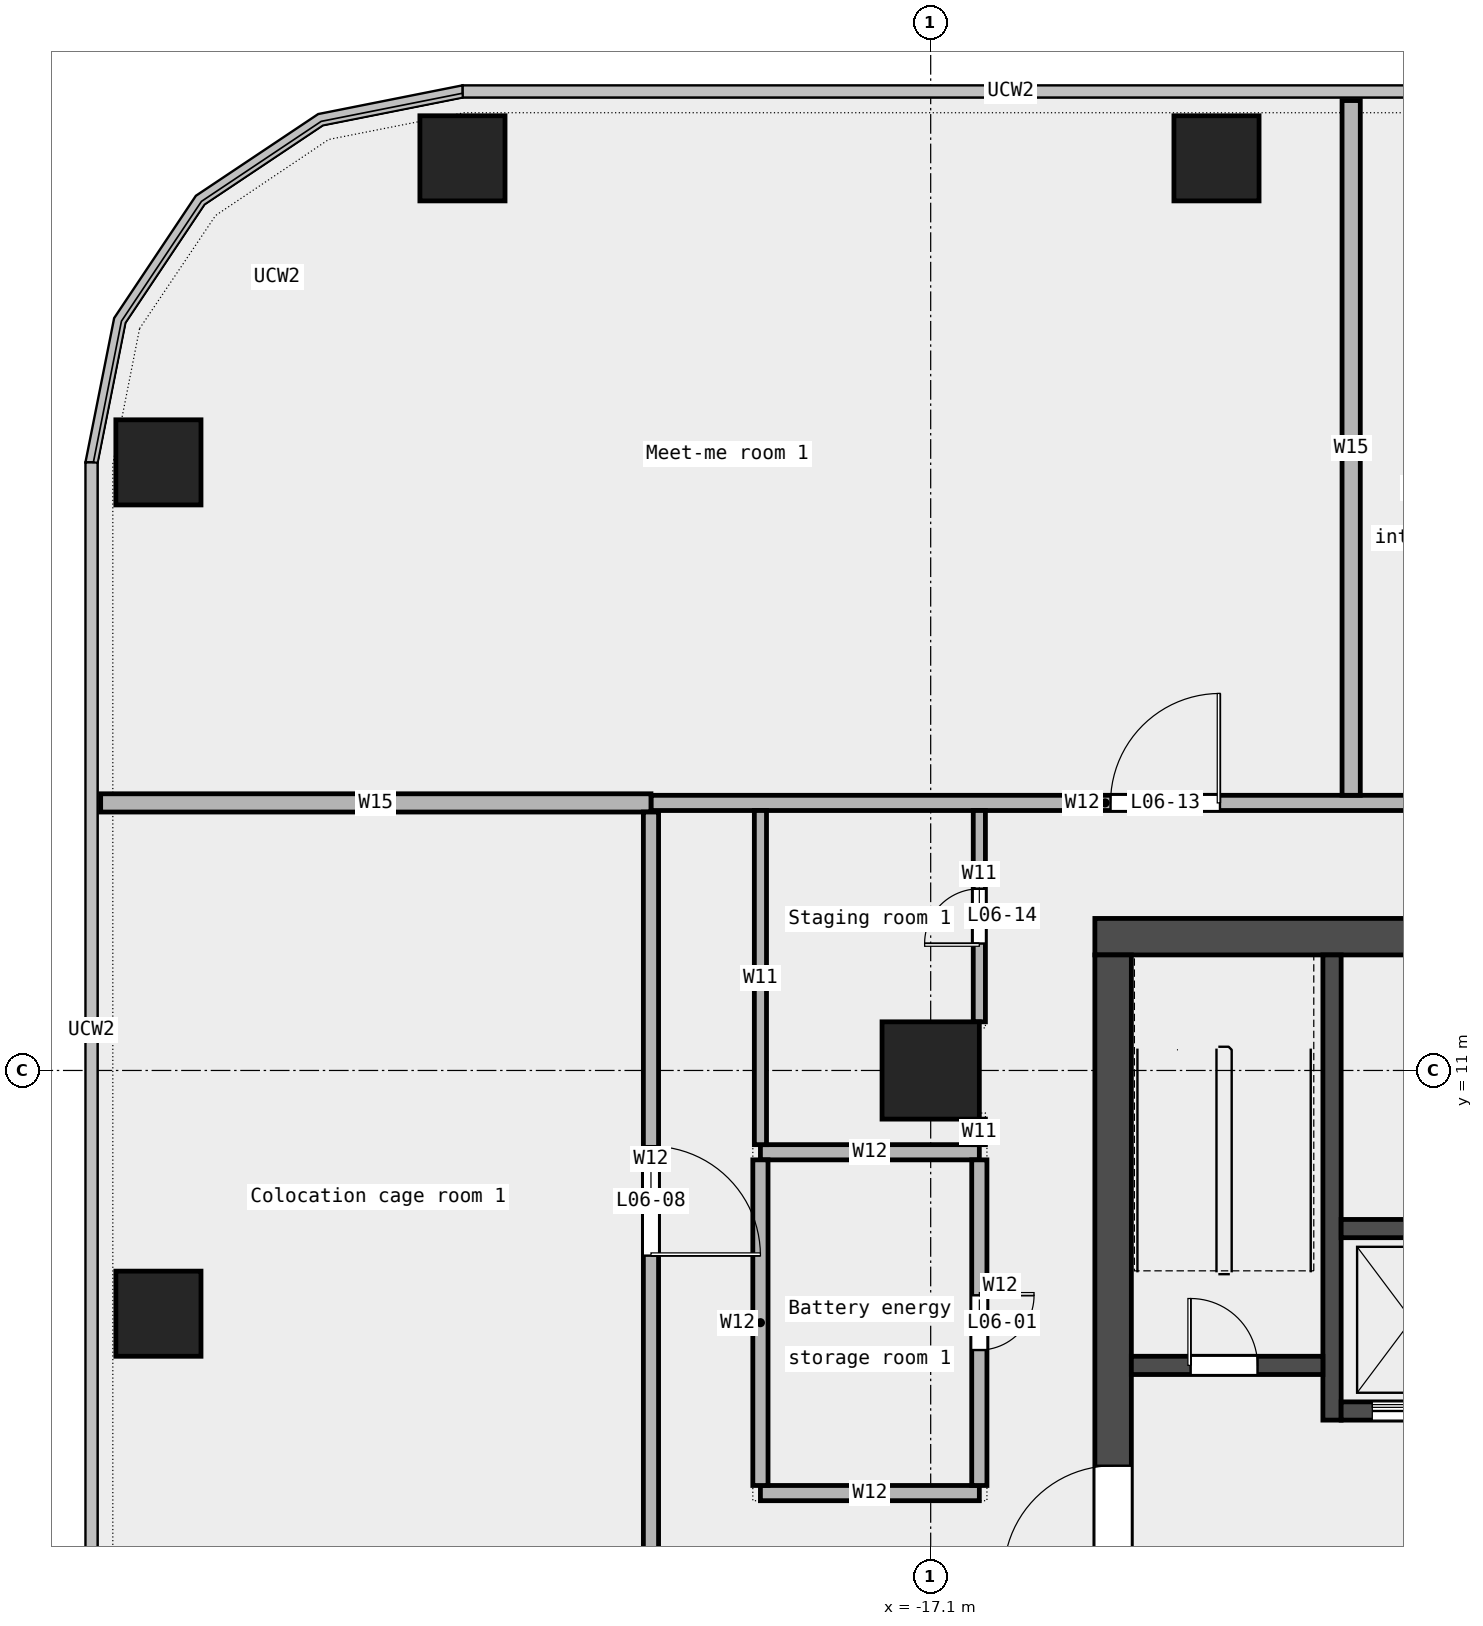
"""IFC4 building model, lengths in metres.
Left out: names, types, materials, properties, quantities, classifications, styles, units other than length and angle.
Written with IfcOpenShell. Run it as: python <this file> out.ifc"""

import sys

from ifc_helpers import new_model, si_unit, direction, frame, frame_2d, origin, origin_2d, place, context, subcontext, project, spatial, rectangle, extrude, element, fill, save


model = new_model("IFC4")
c1 = context("Model", 3, precision=1e-05, world=origin(), true_north=direction((0.0, 1.0)))
c2 = subcontext(c1, "Body", "Model", "MODEL_VIEW")
j1 = project(units=[si_unit("LENGTHUNIT", "METRE"), si_unit("PLANEANGLEUNIT", "RADIAN")], contexts=[c1])
p1 = place(None, origin())
s1 = spatial("IfcSite", under=j1, at=p1, CompositionType="ELEMENT")
p2 = place(p1, origin())
s2 = spatial("IfcBuilding", under=s1, at=p2, CompositionType="ELEMENT")
p3 = place(p2, frame((0.0, 0.0, 35.8)))
s3 = spatial("IfcBuildingStorey", under=s2, at=p3, CompositionType="ELEMENT", Elevation=35.8)
for number, where, z_axis, x_axis in (
    (1, (-12.4, 26.0, 0.0), (0.0, 0.0, 1.0), (1.0, 0.0, 0.0)),
    (2, (-24.8, 26.0, 0.0), (0.0, 0.0, 1.0), (1.0, 0.0, 0.0)),
    (3, (-29.8, 21.0, 0.0), (0.0, 0.0, 1.0), (1.0, 0.0, 0.0)),
    (4, (-29.8, 7.0, 0.0), (0.0, 0.0, 1.0), (1.0, 0.0, 0.0)),
):
    element("IfcColumn", number, at=place(p3, frame(where, z_axis=z_axis, x_axis=x_axis)), inside=s3, PredefinedType="COLUMN", context=c2, shape_type="SweptSolid", body=[
        extrude(rectangle(XDim=1.4, YDim=1.4, at=origin_2d()), origin(), (0.0, 0.0, 1.0), 4.35),
    ])
p4 = place(p3, frame((-17.1, 11.0, 0.0), z_axis=(0.0, 0.0, 1.0), x_axis=(1.0, 0.0, 0.0)))
e5 = element("IfcColumn", 5, at=p4, inside=s3, PredefinedType="COLUMN", context=c2, shape_type="SweptSolid", body=[
    extrude(rectangle(XDim=1.6, YDim=1.6, at=origin_2d()), origin(), (0.0, 0.0, 1.0), 4.35),
])
for number, where, z_axis, x_axis in (
    (6, (-19.9, 4.05, 0.0), (0.0, 0.0, 1.0), (1.0, 0.0, 0.0)),
    (7, (-19.9, 9.655, 0.0), (0.0, 0.0, 1.0), (1.0, 0.0, 0.0)),
):
    element("IfcWall", number, at=place(p3, frame(where, z_axis=z_axis, x_axis=x_axis)), inside=s3, PredefinedType="PARTITIONING", context=c2, shape_type="SweptSolid", body=[
        extrude(rectangle(XDim=3.6, YDim=0.25, at=frame_2d((1.8, 0.0))), origin(), (0.0, 0.0, 1.0), 4.35),
    ])
p5 = place(p3, frame((-21.7, 15.4, 0.0), z_axis=(0.0, 0.0, 1.0), x_axis=(1.0, 0.0, 0.0)))
e8 = element("IfcWall", 8, at=p5, inside=s3, PredefinedType="PARTITIONING", context=c2, shape_type="SweptSolid", body=[
    extrude(rectangle(XDim=14.935, YDim=0.25, at=frame_2d((7.468, 0.0))), origin(), (0.0, 0.0, 1.0), 4.35),
])
p6 = place(p5, frame((12.775, 0.0, 0.0)))
e9 = element("IfcOpeningElement", 9, at=p6, cuts=e8, PredefinedType="OPENING", context=c2, shape_type="SweptSolid", body=[
    extrude(rectangle(XDim=0.9, YDim=2.1, at=frame_2d((0.45, 1.05))), frame((0.0, 0.137, 0.0), z_axis=(0.0, -1.0, 0.0), x_axis=(1.0, 0.0, 0.0)), (0.0, 0.0, 1.0), 0.274),
])
p7 = place(p5, frame((7.558, 0.0, 0.0)))
e10 = element("IfcOpeningElement", 10, at=p7, cuts=e8, PredefinedType="OPENING", context=c2, shape_type="SweptSolid", body=[
    extrude(rectangle(XDim=1.8, YDim=2.1, at=frame_2d((0.9, 1.05))), frame((0.0, 0.137, 0.0), z_axis=(0.0, -1.0, 0.0), x_axis=(1.0, 0.0, 0.0)), (0.0, 0.0, 1.0), 0.274),
])
p8 = place(p3, frame((-30.75, 15.4, 0.0), z_axis=(0.0, 0.0, 1.0), x_axis=(1.0, 0.0, 0.0)))
e11 = element("IfcWall", 11, at=p8, inside=s3, PredefinedType="PARTITIONING", context=c2, shape_type="SweptSolid", body=[
    extrude(rectangle(XDim=9.05, YDim=0.3, at=frame_2d((4.525, 0.0))), origin(), (0.0, 0.0, 1.0), 4.35),
])
p9 = place(p3, frame((-21.7, 2.46, 0.0), z_axis=(0.0, 0.0, 1.0), x_axis=(0.0, 1.0, 0.0)))
e12 = element("IfcWall", 12, at=p9, inside=s3, PredefinedType="PARTITIONING", context=c2, shape_type="SweptSolid", body=[
    extrude(rectangle(XDim=12.79, YDim=0.25, at=frame_2d((6.395, 0.0))), origin(), (0.0, 0.0, 1.0), 4.35),
])
p10 = place(p9, frame((5.495, 0.0, 0.0)))
e13 = element("IfcOpeningElement", 13, at=p10, cuts=e12, PredefinedType="OPENING", context=c2, shape_type="SweptSolid", body=[
    extrude(rectangle(XDim=1.8, YDim=2.1, at=frame_2d((0.9, 1.05))), frame((0.0, 0.137, 0.0), z_axis=(0.0, -1.0, 0.0), x_axis=(1.0, 0.0, 0.0)), (0.0, 0.0, 1.0), 0.274),
])
p11 = place(p3, frame((-19.9, 9.78, 0.0), z_axis=(0.0, 0.0, 1.0), x_axis=(0.0, 1.0, 0.0)))
e14 = element("IfcWall", 14, at=p11, inside=s3, PredefinedType="PARTITIONING", context=c2, shape_type="SweptSolid", body=[
    extrude(rectangle(XDim=5.495, YDim=0.2, at=frame_2d((2.748, 0.0))), origin(), (0.0, 0.0, 1.0), 4.35),
])
p12 = place(p3, frame((-19.9, 4.175, 0.0), z_axis=(0.0, 0.0, 1.0), x_axis=(0.0, 1.0, 0.0)))
e15 = element("IfcWall", 15, at=p12, inside=s3, PredefinedType="PARTITIONING", context=c2, shape_type="SweptSolid", body=[
    extrude(rectangle(XDim=5.355, YDim=0.25, at=frame_2d((2.677, 0.0))), origin(), (0.0, 0.0, 1.0), 4.35),
])
p13 = place(p3, frame((-16.3, 9.78, 0.0), z_axis=(0.0, 0.0, 1.0), x_axis=(0.0, 1.0, 0.0)))
e16 = element("IfcWall", 16, at=p13, inside=s3, PredefinedType="PARTITIONING", context=c2, shape_type="SweptSolid", body=[
    extrude(rectangle(XDim=0.42, YDim=0.2, at=frame_2d((0.21, 0.0))), origin(), (0.0, 0.0, 1.0), 4.35),
])
p14 = place(p3, frame((-16.3, 11.8, 0.0), z_axis=(0.0, 0.0, 1.0), x_axis=(0.0, 1.0, 0.0)))
e17 = element("IfcWall", 17, at=p14, inside=s3, PredefinedType="PARTITIONING", context=c2, shape_type="SweptSolid", body=[
    extrude(rectangle(XDim=3.475, YDim=0.2, at=frame_2d((1.737, 0.0))), origin(), (0.0, 0.0, 1.0), 4.35),
])
p15 = place(p14, frame((1.288, 0.0, 0.0)))
e18 = element("IfcOpeningElement", 18, at=p15, cuts=e17, PredefinedType="OPENING", context=c2, shape_type="SweptSolid", body=[
    extrude(rectangle(XDim=0.9, YDim=2.1, at=frame_2d((0.45, 1.05))), frame((0.0, 0.112, 0.0), z_axis=(0.0, -1.0, 0.0), x_axis=(1.0, 0.0, 0.0)), (0.0, 0.0, 1.0), 0.224),
])
p16 = place(p3, frame((-16.3, 4.175, 0.0), z_axis=(0.0, 0.0, 1.0), x_axis=(0.0, 1.0, 0.0)))
e19 = element("IfcWall", 19, at=p16, inside=s3, PredefinedType="PARTITIONING", context=c2, shape_type="SweptSolid", body=[
    extrude(rectangle(XDim=5.355, YDim=0.25, at=frame_2d((2.677, 0.0))), origin(), (0.0, 0.0, 1.0), 4.35),
])
p17 = place(p16, frame((2.228, 0.0, 0.0)))
e20 = element("IfcOpeningElement", 20, at=p17, cuts=e19, PredefinedType="OPENING", context=c2, shape_type="SweptSolid", body=[
    extrude(rectangle(XDim=0.9, YDim=2.1, at=frame_2d((0.45, 1.05))), frame((0.0, 0.137, 0.0), z_axis=(0.0, -1.0, 0.0), x_axis=(1.0, 0.0, 0.0)), (0.0, 0.0, 1.0), 0.274),
])
p18 = place(p3, frame((-10.185, 15.525, 0.0), z_axis=(0.0, 0.0, 1.0), x_axis=(0.0, 1.0, 0.0)))
e21 = element("IfcWall", 21, at=p18, inside=s3, PredefinedType="PARTITIONING", context=c2, shape_type="SweptSolid", body=[
    extrude(rectangle(XDim=11.425, YDim=0.3, at=frame_2d((5.712, 0.0))), origin(), (0.0, 0.0, 1.0), 4.35),
])
p19 = place(p3, frame((-14.4, 13.2, 0.0), z_axis=(0.0, 0.0, 1.0), x_axis=(1.0, 0.0, 0.0)))
e22 = element("IfcWall", 22, at=p19, inside=s3, PredefinedType="SHEAR", context=c2, shape_type="SweptSolid", body=[
    extrude(rectangle(XDim=28.8, YDim=0.6, at=frame_2d((14.4, 0.0))), origin(), (0.0, 0.0, 1.0), 4.5),
])
p20 = place(p19, frame((6.4, 0.0, 0.0)))
e23 = element("IfcOpeningElement", 23, at=p20, cuts=e22, PredefinedType="OPENING", context=c2, shape_type="SweptSolid", body=[
    extrude(rectangle(XDim=1.0, YDim=2.1, at=frame_2d((0.5, 1.05))), frame((0.0, 0.312, 0.0), z_axis=(0.0, -1.0, 0.0), x_axis=(1.0, 0.0, 0.0)), (0.0, 0.0, 1.0), 0.624),
])
p21 = place(p19, frame((11.462, 0.0, 0.0)))
e24 = element("IfcOpeningElement", 24, at=p21, cuts=e22, PredefinedType="OPENING", context=c2, shape_type="SweptSolid", body=[
    extrude(rectangle(XDim=1.0, YDim=2.1, at=frame_2d((0.5, 1.05))), frame((0.0, 0.312, 0.0), z_axis=(0.0, -1.0, 0.0), x_axis=(1.0, 0.0, 0.0)), (0.0, 0.0, 1.0), 0.624),
])
p22 = place(p19, frame((16.337, 0.0, 0.0)))
e25 = element("IfcOpeningElement", 25, at=p22, cuts=e22, PredefinedType="OPENING", context=c2, shape_type="SweptSolid", body=[
    extrude(rectangle(XDim=1.0, YDim=2.1, at=frame_2d((0.5, 1.05))), frame((0.0, 0.312, 0.0), z_axis=(0.0, -1.0, 0.0), x_axis=(1.0, 0.0, 0.0)), (0.0, 0.0, 1.0), 0.624),
])
p23 = place(p19, frame((21.775, 0.0, 0.0)))
e26 = element("IfcOpeningElement", 26, at=p23, cuts=e22, PredefinedType="OPENING", context=c2, shape_type="SweptSolid", body=[
    extrude(rectangle(XDim=1.0, YDim=2.1, at=frame_2d((0.5, 1.05))), frame((0.0, 0.312, 0.0), z_axis=(0.0, -1.0, 0.0), x_axis=(1.0, 0.0, 0.0)), (0.0, 0.0, 1.0), 0.624),
])
p24 = place(p3, frame((-14.1, -6.6, 0.0), z_axis=(0.0, 0.0, 1.0), x_axis=(0.0, 1.0, 0.0)))
e27 = element("IfcWall", 27, at=p24, inside=s3, PredefinedType="SHEAR", context=c2, shape_type="SweptSolid", body=[
    extrude(rectangle(XDim=19.5, YDim=0.6, at=frame_2d((9.75, 0.0))), origin(), (0.0, 0.0, 1.0), 4.5),
])
p25 = place(p24, frame((9.3, 0.0, 0.0)))
e28 = element("IfcOpeningElement", 28, at=p25, cuts=e27, PredefinedType="OPENING", context=c2, shape_type="SweptSolid", body=[
    extrude(rectangle(XDim=1.8, YDim=2.1, at=frame_2d((0.9, 1.05))), frame((0.0, 0.312, 0.0), z_axis=(0.0, -1.0, 0.0), x_axis=(1.0, 0.0, 0.0)), (0.0, 0.0, 1.0), 0.624),
])
p26 = place(p3, frame((-10.5, 5.25, 0.0), z_axis=(0.0, 0.0, 1.0), x_axis=(0.0, 1.0, 0.0)))
e29 = element("IfcWall", 29, at=p26, inside=s3, PredefinedType="SHEAR", context=c2, shape_type="SweptSolid", body=[
    extrude(rectangle(XDim=7.65, YDim=0.3, at=frame_2d((3.825, 0.0))), origin(), (0.0, 0.0, 1.0), 4.5),
])
p27 = place(p3, frame((-13.8, 6.15, 0.0), z_axis=(0.0, 0.0, 1.0), x_axis=(1.0, 0.0, 0.0)))
e30 = element("IfcWall", 30, at=p27, inside=s3, PredefinedType="SOLIDWALL", context=c2, shape_type="SweptSolid", body=[
    extrude(rectangle(XDim=3.15, YDim=0.3, at=frame_2d((1.575, 0.0))), origin(), (0.0, 0.0, 1.0), 4.5),
])
p28 = place(p27, frame((0.975, 0.0, 0.0)))
e31 = element("IfcOpeningElement", 31, at=p28, cuts=e30, PredefinedType="OPENING", context=c2, shape_type="SweptSolid", body=[
    extrude(rectangle(XDim=1.1, YDim=2.1, at=frame_2d((0.55, 1.05))), frame((0.0, 0.162, 0.0), z_axis=(0.0, -1.0, 0.0), x_axis=(1.0, 0.0, 0.0)), (0.0, 0.0, 1.0), 0.324),
])
p29 = place(p3, frame((-10.35, 5.4, 0.0), z_axis=(0.0, 0.0, 1.0), x_axis=(1.0, 0.0, 0.0)))
e32 = element("IfcWall", 32, at=p29, inside=s3, PredefinedType="SOLIDWALL", context=c2, shape_type="SweptSolid", body=[
    extrude(rectangle(XDim=20.7, YDim=0.3, at=frame_2d((10.35, 0.0))), origin(), (0.0, 0.0, 1.0), 4.5),
])
p30 = place(p29, frame((0.512, 0.0, 0.0)))
e33 = element("IfcOpeningElement", 33, at=p30, cuts=e32, PredefinedType="OPENING", context=c2, shape_type="SweptSolid", body=[
    extrude(rectangle(XDim=1.3, YDim=2.1, at=frame_2d((0.65, 1.05))), frame((0.0, 0.162, 0.0), z_axis=(0.0, -1.0, 0.0), x_axis=(1.0, 0.0, 0.0)), (0.0, 0.0, 1.0), 0.324),
])
p31 = place(p3, frame((-10.35, 8.4, 0.0), z_axis=(0.0, 0.0, 1.0), x_axis=(1.0, 0.0, 0.0)))
e34 = element("IfcWall", 34, at=p31, inside=s3, PredefinedType="SOLIDWALL", context=c2, shape_type="SweptSolid", body=[
    extrude(rectangle(XDim=20.7, YDim=0.3, at=frame_2d((10.35, 0.0))), origin(), (0.0, 0.0, 1.0), 4.5),
])
p32 = place(p17, origin())
e35 = element("IfcDoor", 35, at=p32, inside=s3, OperationType="SINGLE_SWING_LEFT", PredefinedType="DOOR", context=c2, shape_type="SweptSolid", body=[
    extrude(rectangle(XDim=0.9, YDim=2.1, at=frame_2d((0.45, 1.05))), frame((0.0, 0.025, 0.0), z_axis=(0.0, -1.0, 0.0), x_axis=(1.0, 0.0, 0.0)), (0.0, 0.0, 1.0), 0.05),
])
fill(e20, e35)
p33 = place(p10, origin())
e36 = element("IfcDoor", 36, at=p33, inside=s3, OperationType="DOUBLE_DOOR_SINGLE_SWING", PredefinedType="DOOR", context=c2, shape_type="SweptSolid", body=[
    extrude(rectangle(XDim=1.8, YDim=2.1, at=frame_2d((0.9, 1.05))), frame((0.0, 0.025, 0.0), z_axis=(0.0, -1.0, 0.0), x_axis=(1.0, 0.0, 0.0)), (0.0, 0.0, 1.0), 0.05),
])
fill(e13, e36)
p34 = place(p7, origin())
e37 = element("IfcDoor", 37, at=p34, inside=s3, OperationType="DOUBLE_DOOR_SINGLE_SWING", PredefinedType="DOOR", context=c2, shape_type="SweptSolid", body=[
    extrude(rectangle(XDim=1.8, YDim=2.1, at=frame_2d((0.9, 1.05))), frame((0.0, 0.025, 0.0), z_axis=(0.0, -1.0, 0.0), x_axis=(1.0, 0.0, 0.0)), (0.0, 0.0, 1.0), 0.05),
])
fill(e10, e37)
p35 = place(p15, origin())
e38 = element("IfcDoor", 38, at=p35, inside=s3, OperationType="SINGLE_SWING_LEFT", PredefinedType="DOOR", context=c2, shape_type="SweptSolid", body=[
    extrude(rectangle(XDim=0.9, YDim=2.1, at=frame_2d((0.45, 1.05))), frame((0.0, 0.025, 0.0), z_axis=(0.0, -1.0, 0.0), x_axis=(1.0, 0.0, 0.0)), (0.0, 0.0, 1.0), 0.05),
])
fill(e18, e38)
p36 = place(p28, origin())
e39 = element("IfcDoor", 39, at=p36, inside=s3, OperationType="SINGLE_SWING_LEFT", PredefinedType="DOOR", context=c2, shape_type="SweptSolid", body=[
    extrude(rectangle(XDim=1.1, YDim=2.1, at=frame_2d((0.55, 1.05))), frame((0.0, 0.025, 0.0), z_axis=(0.0, -1.0, 0.0), x_axis=(1.0, 0.0, 0.0)), (0.0, 0.0, 1.0), 0.05),
])
fill(e31, e39)
p37 = place(p25, origin())
e40 = element("IfcDoor", 40, at=p37, inside=s3, OperationType="DOUBLE_DOOR_SINGLE_SWING", PredefinedType="DOOR", context=c2, shape_type="SweptSolid", body=[
    extrude(rectangle(XDim=1.8, YDim=2.1, at=frame_2d((0.9, 1.05))), frame((0.0, 0.025, 0.0), z_axis=(0.0, -1.0, 0.0), x_axis=(1.0, 0.0, 0.0)), (0.0, 0.0, 1.0), 0.05),
])
fill(e28, e40)
p38 = place(p30, origin())
e41 = element("IfcDoor", 41, at=p38, inside=s3, OperationType="DOUBLE_DOOR_SLIDING", PredefinedType="DOOR", context=c2, shape_type="SweptSolid", body=[
    extrude(rectangle(XDim=1.3, YDim=2.1, at=frame_2d((0.65, 1.05))), frame((0.0, 0.025, 0.0), z_axis=(0.0, -1.0, 0.0), x_axis=(1.0, 0.0, 0.0)), (0.0, 0.0, 1.0), 0.05),
])
fill(e33, e41)
save(model, sys.argv[1])
